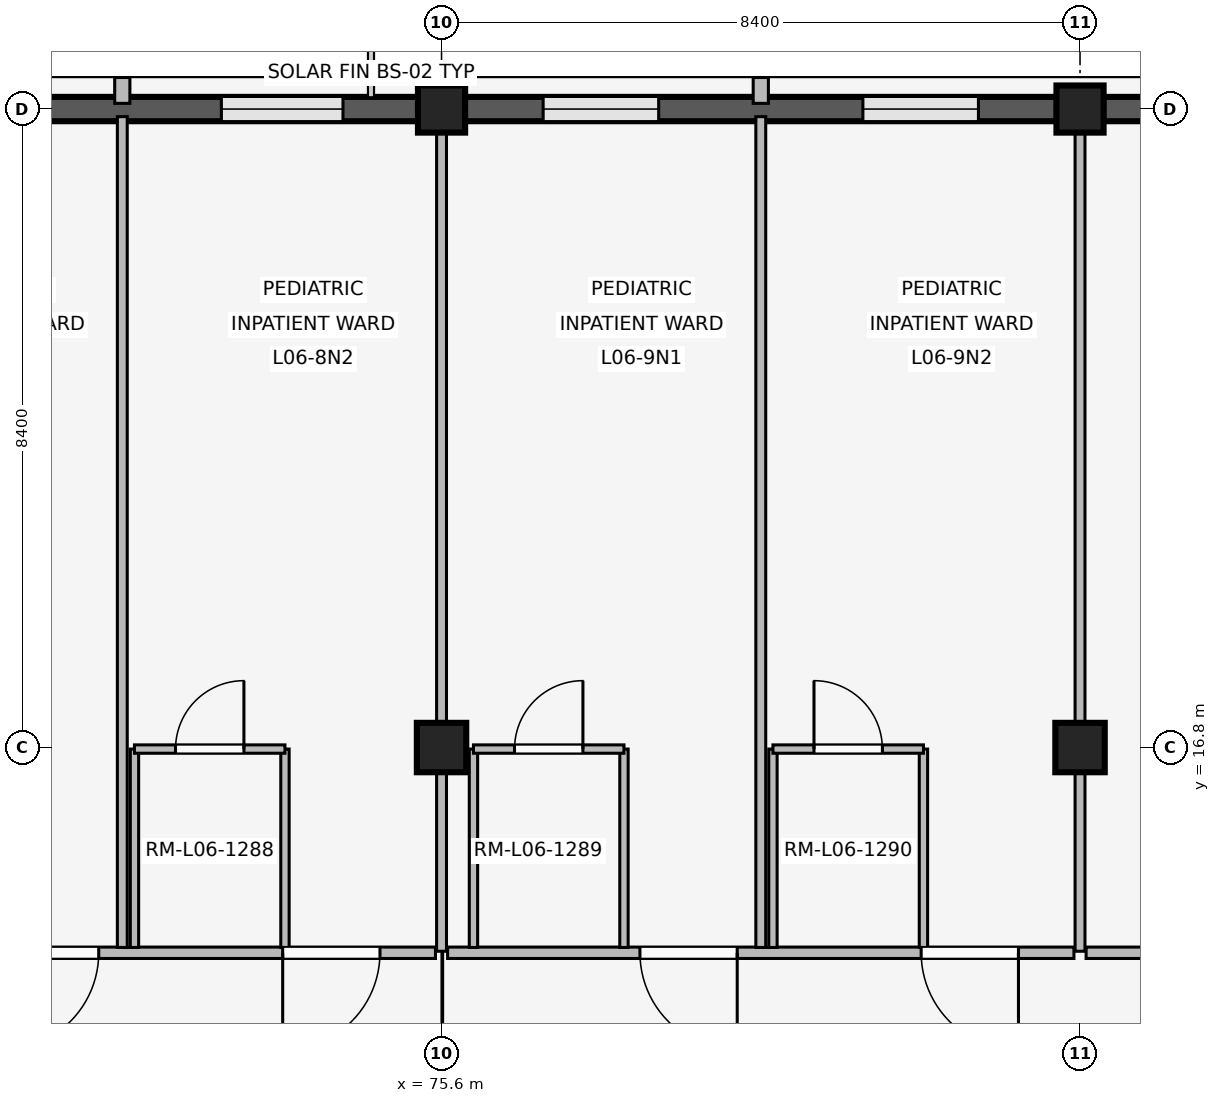
"""IFC4 building model, lengths in metres.
Left out: names, types, materials, properties, quantities, classifications, styles, units other than length and angle.
Written with IfcOpenShell. Run it as: python <this file> out.ifc"""

import sys

from ifc_helpers import new_model, si_unit, direction, frame, frame_2d, origin, origin_2d, place, context, subcontext, project, spatial, rectangle, extrude, element, fill, save


model = new_model("IFC4")
c1 = context("Model", 3, precision=1e-05, world=origin(), true_north=direction((0.0, 1.0)))
c2 = subcontext(c1, "Body", "Model", "MODEL_VIEW")
j1 = project(units=[si_unit("LENGTHUNIT", "METRE"), si_unit("PLANEANGLEUNIT", "RADIAN")], contexts=[c1])
p1 = place(None, origin())
s1 = spatial("IfcSite", under=j1, at=p1, CompositionType="ELEMENT")
p2 = place(p1, origin())
s2 = spatial("IfcBuilding", under=s1, at=p2, CompositionType="ELEMENT")
p3 = place(p2, frame((0.0, 0.0, 24.6)))
s3 = spatial("IfcBuildingStorey", under=s2, at=p3, CompositionType="ELEMENT", Elevation=24.6)
p4 = place(p3, frame((75.6, 16.8, 0.0), z_axis=(0.0, 0.0, 1.0), x_axis=(1.0, 0.0, 0.0)))
e1 = element("IfcColumn", 1, at=p4, inside=s3, PredefinedType="COLUMN", context=c2, shape_type="SweptSolid", body=[
    extrude(rectangle(XDim=0.65, YDim=0.65, at=origin_2d()), origin(), (0.0, 0.0, 1.0), 4.2),
])
p5 = place(p3, frame((75.6, 25.2, 0.0), z_axis=(0.0, 0.0, 1.0), x_axis=(1.0, 0.0, 0.0)))
e2 = element("IfcColumn", 2, at=p5, inside=s3, PredefinedType="COLUMN", context=c2, shape_type="SweptSolid", body=[
    extrude(rectangle(XDim=0.62, YDim=0.62, at=origin_2d()), origin(), (0.0, 0.0, 1.0), 4.2),
])
p6 = place(p3, frame((84.0, 16.8, 0.0), z_axis=(0.0, 0.0, 1.0), x_axis=(1.0, 0.0, 0.0)))
e3 = element("IfcColumn", 3, at=p6, inside=s3, PredefinedType="COLUMN", context=c2, shape_type="SweptSolid", body=[
    extrude(rectangle(XDim=0.65, YDim=0.65, at=origin_2d()), origin(), (0.0, 0.0, 1.0), 4.2),
])
p7 = place(p3, frame((84.0, 25.2, 0.0), z_axis=(0.0, 0.0, 1.0), x_axis=(1.0, 0.0, 0.0)))
e4 = element("IfcColumn", 4, at=p7, inside=s3, PredefinedType="COLUMN", context=c2, shape_type="SweptSolid", body=[
    extrude(rectangle(XDim=0.62, YDim=0.62, at=origin_2d()), origin(), (0.0, 0.0, 1.0), 4.2),
])
p8 = place(p3, frame((67.505, 25.2, 0.0), z_axis=(0.0, 0.0, 1.0), x_axis=(1.0, 0.0, 0.0)))
e5 = element("IfcWall", 5, at=p8, inside=s3, PredefinedType="SOLIDWALL", context=c2, shape_type="SweptSolid", body=[
    extrude(rectangle(XDim=7.79, YDim=0.32, at=frame_2d((3.895, 0.0))), origin(), (0.0, 0.0, 1.0), 3.34),
])
p9 = place(p8, frame((0.992, 0.0, 0.85)))
e6 = element("IfcOpeningElement", 6, at=p9, cuts=e5, PredefinedType="OPENING", context=c2, shape_type="SweptSolid", body=[
    extrude(rectangle(XDim=1.6, YDim=1.65, at=frame_2d((0.8, 0.825))), frame((0.0, 0.17, 0.0), z_axis=(0.0, -1.0, 0.0), x_axis=(1.0, 0.0, 0.0)), (0.0, 0.0, 1.0), 0.34),
])
p10 = place(p8, frame((5.198, 0.0, 0.85)))
e7 = element("IfcOpeningElement", 7, at=p10, cuts=e5, PredefinedType="OPENING", context=c2, shape_type="SweptSolid", body=[
    extrude(rectangle(XDim=1.6, YDim=1.65, at=frame_2d((0.8, 0.825))), frame((0.0, 0.17, 0.0), z_axis=(0.0, -1.0, 0.0), x_axis=(1.0, 0.0, 0.0)), (0.0, 0.0, 1.0), 0.34),
])
p11 = place(p3, frame((71.4, 25.275, 0.0), z_axis=(0.0, 0.0, 1.0), x_axis=(0.0, 1.0, 0.0)))
e8 = element("IfcWall", 8, at=p11, inside=s3, PredefinedType="ELEMENTEDWALL", context=c2, shape_type="SweptSolid", body=[
    extrude(rectangle(XDim=0.34, YDim=0.2, at=frame_2d((0.17, 0.0))), origin(), (0.0, 0.0, 1.0), 3.32),
])
p12 = place(p3, frame((75.905, 25.2, 0.0), z_axis=(0.0, 0.0, 1.0), x_axis=(1.0, 0.0, 0.0)))
e9 = element("IfcWall", 9, at=p12, inside=s3, PredefinedType="SOLIDWALL", context=c2, shape_type="SweptSolid", body=[
    extrude(rectangle(XDim=7.79, YDim=0.32, at=frame_2d((3.895, 0.0))), origin(), (0.0, 0.0, 1.0), 3.34),
])
p13 = place(p12, frame((1.032, 0.0, 0.85)))
e10 = element("IfcOpeningElement", 10, at=p13, cuts=e9, PredefinedType="OPENING", context=c2, shape_type="SweptSolid", body=[
    extrude(rectangle(XDim=1.52, YDim=1.65, at=frame_2d((0.76, 0.825))), frame((0.0, 0.17, 0.0), z_axis=(0.0, -1.0, 0.0), x_axis=(1.0, 0.0, 0.0)), (0.0, 0.0, 1.0), 0.34),
])
p14 = place(p12, frame((5.238, 0.0, 0.85)))
e11 = element("IfcOpeningElement", 11, at=p14, cuts=e9, PredefinedType="OPENING", context=c2, shape_type="SweptSolid", body=[
    extrude(rectangle(XDim=1.52, YDim=1.65, at=frame_2d((0.76, 0.825))), frame((0.0, 0.17, 0.0), z_axis=(0.0, -1.0, 0.0), x_axis=(1.0, 0.0, 0.0)), (0.0, 0.0, 1.0), 0.34),
])
p15 = place(p3, frame((79.8, 25.275, 0.0), z_axis=(0.0, 0.0, 1.0), x_axis=(0.0, 1.0, 0.0)))
e12 = element("IfcWall", 12, at=p15, inside=s3, PredefinedType="ELEMENTEDWALL", context=c2, shape_type="SweptSolid", body=[
    extrude(rectangle(XDim=0.34, YDim=0.2, at=frame_2d((0.17, 0.0))), origin(), (0.0, 0.0, 1.0), 3.32),
])
p16 = place(p3, frame((84.305, 25.2, 0.0), z_axis=(0.0, 0.0, 1.0), x_axis=(1.0, 0.0, 0.0)))
e13 = element("IfcWall", 13, at=p16, inside=s3, PredefinedType="SOLIDWALL", context=c2, shape_type="SweptSolid", body=[
    extrude(rectangle(XDim=7.79, YDim=0.32, at=frame_2d((3.895, 0.0))), origin(), (0.0, 0.0, 1.0), 3.34),
])
p17 = place(p16, frame((1.117, 0.0, 0.85)))
e14 = element("IfcOpeningElement", 14, at=p17, cuts=e13, PredefinedType="OPENING", context=c2, shape_type="SweptSolid", body=[
    extrude(rectangle(XDim=1.35, YDim=1.55, at=frame_2d((0.675, 0.775))), frame((0.0, 0.17, 0.0), z_axis=(0.0, -1.0, 0.0), x_axis=(1.0, 0.0, 0.0)), (0.0, 0.0, 1.0), 0.34),
])
p18 = place(p16, frame((5.323, 0.0, 0.85)))
e15 = element("IfcOpeningElement", 15, at=p18, cuts=e13, PredefinedType="OPENING", context=c2, shape_type="SweptSolid", body=[
    extrude(rectangle(XDim=1.35, YDim=1.55, at=frame_2d((0.675, 0.775))), frame((0.0, 0.17, 0.0), z_axis=(0.0, -1.0, 0.0), x_axis=(1.0, 0.0, 0.0)), (0.0, 0.0, 1.0), 0.34),
])
p19 = place(p3, frame((75.52, 14.1, 0.0), z_axis=(0.0, 0.0, 1.0), x_axis=(-1.0, 0.0, 0.0)))
e16 = element("IfcWall", 16, at=p19, inside=s3, PredefinedType="PARTITIONING", context=c2, shape_type="SweptSolid", body=[
    extrude(rectangle(XDim=8.24, YDim=0.15, at=frame_2d((4.12, 0.0))), origin(), (0.0, 0.0, 1.0), 3.32),
])
p20 = place(p19, frame((0.73, 0.0, 0.0)))
e17 = element("IfcOpeningElement", 17, at=p20, cuts=e16, PredefinedType="OPENING", context=c2, shape_type="SweptSolid", body=[
    extrude(rectangle(XDim=1.28, YDim=2.2, at=frame_2d((0.64, 1.1))), frame((0.0, 0.085, 0.0), z_axis=(0.0, -1.0, 0.0), x_axis=(1.0, 0.0, 0.0)), (0.0, 0.0, 1.0), 0.17),
])
p21 = place(p19, frame((4.43, 0.0, 0.0)))
e18 = element("IfcOpeningElement", 18, at=p21, cuts=e16, PredefinedType="OPENING", context=c2, shape_type="SweptSolid", body=[
    extrude(rectangle(XDim=1.28, YDim=2.2, at=frame_2d((0.64, 1.1))), frame((0.0, 0.085, 0.0), z_axis=(0.0, -1.0, 0.0), x_axis=(1.0, 0.0, 0.0)), (0.0, 0.0, 1.0), 0.17),
])
p22 = place(p3, frame((71.4, 14.17, 0.0), z_axis=(0.0, 0.0, 1.0), x_axis=(0.0, 1.0, 0.0)))
e19 = element("IfcWall", 19, at=p22, inside=s3, PredefinedType="PARTITIONING", context=c2, shape_type="SweptSolid", body=[
    extrude(rectangle(XDim=10.93, YDim=0.13, at=frame_2d((5.465, 0.0))), origin(), (0.0, 0.0, 1.0), 3.32),
])
for number, where, z_axis, x_axis in (
    (20, (71.56, 14.17, 0.0), (0.0, 0.0, 1.0), (0.0, 1.0, 0.0)),
    (21, (73.54, 14.17, 0.0), (0.0, 0.0, 1.0), (0.0, 1.0, 0.0)),
):
    element("IfcWall", number, at=place(p3, frame(where, z_axis=z_axis, x_axis=x_axis)), inside=s3, PredefinedType="PARTITIONING", context=c2, shape_type="SweptSolid", body=[
        extrude(rectangle(XDim=2.61, YDim=0.11, at=frame_2d((1.305, 0.0))), origin(), (0.0, 0.0, 1.0), 3.32),
    ])
p23 = place(p3, frame((71.56, 16.78, 0.0), z_axis=(0.0, 0.0, 1.0), x_axis=(1.0, 0.0, 0.0)))
e22 = element("IfcWall", 22, at=p23, inside=s3, PredefinedType="PARTITIONING", context=c2, shape_type="SweptSolid", body=[
    extrude(rectangle(XDim=1.98, YDim=0.11, at=frame_2d((0.99, 0.0))), origin(), (0.0, 0.0, 1.0), 3.32),
])
p24 = place(p23, frame((0.54, 0.0, 0.0)))
e23 = element("IfcOpeningElement", 23, at=p24, cuts=e22, PredefinedType="OPENING", context=c2, shape_type="SweptSolid", body=[
    extrude(rectangle(XDim=0.9, YDim=2.1, at=frame_2d((0.45, 1.05))), frame((0.0, 0.065, 0.0), z_axis=(0.0, -1.0, 0.0), x_axis=(1.0, 0.0, 0.0)), (0.0, 0.0, 1.0), 0.13),
])
p25 = place(p3, frame((75.6, 14.12, 0.0), z_axis=(0.0, 0.0, 1.0), x_axis=(0.0, 1.0, 0.0)))
e24 = element("IfcWall", 24, at=p25, inside=s3, PredefinedType="PARTITIONING", context=c2, shape_type="SweptSolid", body=[
    extrude(rectangle(XDim=10.94, YDim=0.13, at=frame_2d((5.47, 0.0))), origin(), (0.0, 0.0, 1.0), 3.32),
])
p26 = place(p3, frame((83.92, 14.1, 0.0), z_axis=(0.0, 0.0, 1.0), x_axis=(-1.0, 0.0, 0.0)))
e25 = element("IfcWall", 25, at=p26, inside=s3, PredefinedType="PARTITIONING", context=c2, shape_type="SweptSolid", body=[
    extrude(rectangle(XDim=8.24, YDim=0.15, at=frame_2d((4.12, 0.0))), origin(), (0.0, 0.0, 1.0), 3.32),
])
p27 = place(p26, frame((0.73, 0.0, 0.0)))
e26 = element("IfcOpeningElement", 26, at=p27, cuts=e25, PredefinedType="OPENING", context=c2, shape_type="SweptSolid", body=[
    extrude(rectangle(XDim=1.28, YDim=2.2, at=frame_2d((0.64, 1.1))), frame((0.0, 0.085, 0.0), z_axis=(0.0, -1.0, 0.0), x_axis=(1.0, 0.0, 0.0)), (0.0, 0.0, 1.0), 0.17),
])
p28 = place(p26, frame((4.43, 0.0, 0.0)))
e27 = element("IfcOpeningElement", 27, at=p28, cuts=e25, PredefinedType="OPENING", context=c2, shape_type="SweptSolid", body=[
    extrude(rectangle(XDim=1.28, YDim=2.2, at=frame_2d((0.64, 1.1))), frame((0.0, 0.085, 0.0), z_axis=(0.0, -1.0, 0.0), x_axis=(1.0, 0.0, 0.0)), (0.0, 0.0, 1.0), 0.17),
])
p29 = place(p3, frame((79.8, 14.17, 0.0), z_axis=(0.0, 0.0, 1.0), x_axis=(0.0, 1.0, 0.0)))
e28 = element("IfcWall", 28, at=p29, inside=s3, PredefinedType="PARTITIONING", context=c2, shape_type="SweptSolid", body=[
    extrude(rectangle(XDim=10.93, YDim=0.13, at=frame_2d((5.465, 0.0))), origin(), (0.0, 0.0, 1.0), 3.32),
])
for number, where, z_axis, x_axis in (
    (29, (76.02, 14.17, 0.0), (0.0, 0.0, 1.0), (0.0, 1.0, 0.0)),
    (30, (78.0, 14.17, 0.0), (0.0, 0.0, 1.0), (0.0, 1.0, 0.0)),
):
    element("IfcWall", number, at=place(p3, frame(where, z_axis=z_axis, x_axis=x_axis)), inside=s3, PredefinedType="PARTITIONING", context=c2, shape_type="SweptSolid", body=[
        extrude(rectangle(XDim=2.61, YDim=0.11, at=frame_2d((1.305, 0.0))), origin(), (0.0, 0.0, 1.0), 3.32),
    ])
p30 = place(p3, frame((76.02, 16.78, 0.0), z_axis=(0.0, 0.0, 1.0), x_axis=(1.0, 0.0, 0.0)))
e31 = element("IfcWall", 31, at=p30, inside=s3, PredefinedType="PARTITIONING", context=c2, shape_type="SweptSolid", body=[
    extrude(rectangle(XDim=1.98, YDim=0.11, at=frame_2d((0.99, 0.0))), origin(), (0.0, 0.0, 1.0), 3.32),
])
p31 = place(p30, frame((0.54, 0.0, 0.0)))
e32 = element("IfcOpeningElement", 32, at=p31, cuts=e31, PredefinedType="OPENING", context=c2, shape_type="SweptSolid", body=[
    extrude(rectangle(XDim=0.9, YDim=2.1, at=frame_2d((0.45, 1.05))), frame((0.0, 0.065, 0.0), z_axis=(0.0, -1.0, 0.0), x_axis=(1.0, 0.0, 0.0)), (0.0, 0.0, 1.0), 0.13),
])
for number, where, z_axis, x_axis in (
    (33, (79.96, 14.17, 0.0), (0.0, 0.0, 1.0), (0.0, 1.0, 0.0)),
    (34, (81.94, 14.17, 0.0), (0.0, 0.0, 1.0), (0.0, 1.0, 0.0)),
):
    element("IfcWall", number, at=place(p3, frame(where, z_axis=z_axis, x_axis=x_axis)), inside=s3, PredefinedType="PARTITIONING", context=c2, shape_type="SweptSolid", body=[
        extrude(rectangle(XDim=2.61, YDim=0.11, at=frame_2d((1.305, 0.0))), origin(), (0.0, 0.0, 1.0), 3.32),
    ])
p32 = place(p3, frame((79.96, 16.78, 0.0), z_axis=(0.0, 0.0, 1.0), x_axis=(1.0, 0.0, 0.0)))
e35 = element("IfcWall", 35, at=p32, inside=s3, PredefinedType="PARTITIONING", context=c2, shape_type="SweptSolid", body=[
    extrude(rectangle(XDim=1.98, YDim=0.11, at=frame_2d((0.99, 0.0))), origin(), (0.0, 0.0, 1.0), 3.32),
])
p33 = place(p32, frame((0.54, 0.0, 0.0)))
e36 = element("IfcOpeningElement", 36, at=p33, cuts=e35, PredefinedType="OPENING", context=c2, shape_type="SweptSolid", body=[
    extrude(rectangle(XDim=0.9, YDim=2.1, at=frame_2d((0.45, 1.05))), frame((0.0, 0.065, 0.0), z_axis=(0.0, -1.0, 0.0), x_axis=(1.0, 0.0, 0.0)), (0.0, 0.0, 1.0), 0.13),
])
p34 = place(p3, frame((84.0, 14.12, 0.0), z_axis=(0.0, 0.0, 1.0), x_axis=(0.0, 1.0, 0.0)))
e37 = element("IfcWall", 37, at=p34, inside=s3, PredefinedType="PARTITIONING", context=c2, shape_type="SweptSolid", body=[
    extrude(rectangle(XDim=10.94, YDim=0.13, at=frame_2d((5.47, 0.0))), origin(), (0.0, 0.0, 1.0), 3.32),
])
p35 = place(p3, frame((92.04, 14.1, 0.0), z_axis=(0.0, 0.0, 1.0), x_axis=(-1.0, 0.0, 0.0)))
e38 = element("IfcWall", 38, at=p35, inside=s3, PredefinedType="PARTITIONING", context=c2, shape_type="SweptSolid", body=[
    extrude(rectangle(XDim=7.96, YDim=0.15, at=frame_2d((3.98, 0.0))), origin(), (0.0, 0.0, 1.0), 3.32),
])
p36 = place(p35, frame((3.355, 0.0, 0.0)))
e39 = element("IfcOpeningElement", 39, at=p36, cuts=e38, PredefinedType="OPENING", context=c2, shape_type="SweptSolid", body=[
    extrude(rectangle(XDim=1.25, YDim=2.2, at=frame_2d((0.625, 1.1))), frame((0.0, 0.085, 0.0), z_axis=(0.0, -1.0, 0.0), x_axis=(1.0, 0.0, 0.0)), (0.0, 0.0, 1.0), 0.17),
])
p37 = place(p10, origin())
e40 = element("IfcWindow", 40, at=p37, inside=s3, PartitioningType="SINGLE_PANEL", PredefinedType="WINDOW", context=c2, shape_type="SweptSolid", body=[
    extrude(rectangle(XDim=1.6, YDim=1.65, at=frame_2d((0.8, 0.825))), frame((0.0, 0.03, 0.0), z_axis=(0.0, -1.0, 0.0), x_axis=(1.0, 0.0, 0.0)), (0.0, 0.0, 1.0), 0.06),
])
fill(e7, e40)
p38 = place(p13, origin())
e41 = element("IfcWindow", 41, at=p38, inside=s3, PartitioningType="SINGLE_PANEL", PredefinedType="WINDOW", context=c2, shape_type="SweptSolid", body=[
    extrude(rectangle(XDim=1.52, YDim=1.65, at=frame_2d((0.76, 0.825))), frame((0.0, 0.03, 0.0), z_axis=(0.0, -1.0, 0.0), x_axis=(1.0, 0.0, 0.0)), (0.0, 0.0, 1.0), 0.06),
])
fill(e10, e41)
p39 = place(p14, origin())
e42 = element("IfcWindow", 42, at=p39, inside=s3, PartitioningType="SINGLE_PANEL", PredefinedType="WINDOW", context=c2, shape_type="SweptSolid", body=[
    extrude(rectangle(XDim=1.52, YDim=1.65, at=frame_2d((0.76, 0.825))), frame((0.0, 0.03, 0.0), z_axis=(0.0, -1.0, 0.0), x_axis=(1.0, 0.0, 0.0)), (0.0, 0.0, 1.0), 0.06),
])
fill(e11, e42)
p40 = place(p20, origin())
e43 = element("IfcDoor", 43, at=p40, inside=s3, OperationType="SINGLE_SWING_RIGHT", PredefinedType="DOOR", context=c2, shape_type="SweptSolid", body=[
    extrude(rectangle(XDim=1.28, YDim=2.2, at=frame_2d((0.64, 1.1))), frame((0.0, 0.025, 0.0), z_axis=(0.0, -1.0, 0.0), x_axis=(1.0, 0.0, 0.0)), (0.0, 0.0, 1.0), 0.05),
])
fill(e17, e43)
p41 = place(p21, origin())
e44 = element("IfcDoor", 44, at=p41, inside=s3, OperationType="SINGLE_SWING_RIGHT", PredefinedType="DOOR", context=c2, shape_type="SweptSolid", body=[
    extrude(rectangle(XDim=1.28, YDim=2.2, at=frame_2d((0.64, 1.1))), frame((0.0, 0.025, 0.0), z_axis=(0.0, -1.0, 0.0), x_axis=(1.0, 0.0, 0.0)), (0.0, 0.0, 1.0), 0.05),
])
fill(e18, e44)
p42 = place(p24, origin())
e45 = element("IfcDoor", 45, at=p42, inside=s3, OperationType="SINGLE_SWING_RIGHT", PredefinedType="DOOR", context=c2, shape_type="SweptSolid", body=[
    extrude(rectangle(XDim=0.9, YDim=2.1, at=frame_2d((0.45, 1.05))), frame((0.0, 0.025, 0.0), z_axis=(0.0, -1.0, 0.0), x_axis=(1.0, 0.0, 0.0)), (0.0, 0.0, 1.0), 0.05),
])
fill(e23, e45)
p43 = place(p27, origin())
e46 = element("IfcDoor", 46, at=p43, inside=s3, OperationType="SINGLE_SWING_LEFT", PredefinedType="DOOR", context=c2, shape_type="SweptSolid", body=[
    extrude(rectangle(XDim=1.28, YDim=2.2, at=frame_2d((0.64, 1.1))), frame((0.0, 0.025, 0.0), z_axis=(0.0, -1.0, 0.0), x_axis=(1.0, 0.0, 0.0)), (0.0, 0.0, 1.0), 0.05),
])
fill(e26, e46)
p44 = place(p28, origin())
e47 = element("IfcDoor", 47, at=p44, inside=s3, OperationType="SINGLE_SWING_LEFT", PredefinedType="DOOR", context=c2, shape_type="SweptSolid", body=[
    extrude(rectangle(XDim=1.28, YDim=2.2, at=frame_2d((0.64, 1.1))), frame((0.0, 0.025, 0.0), z_axis=(0.0, -1.0, 0.0), x_axis=(1.0, 0.0, 0.0)), (0.0, 0.0, 1.0), 0.05),
])
fill(e27, e47)
p45 = place(p31, origin())
e48 = element("IfcDoor", 48, at=p45, inside=s3, OperationType="SINGLE_SWING_RIGHT", PredefinedType="DOOR", context=c2, shape_type="SweptSolid", body=[
    extrude(rectangle(XDim=0.9, YDim=2.1, at=frame_2d((0.45, 1.05))), frame((0.0, 0.025, 0.0), z_axis=(0.0, -1.0, 0.0), x_axis=(1.0, 0.0, 0.0)), (0.0, 0.0, 1.0), 0.05),
])
fill(e32, e48)
p46 = place(p33, origin())
e49 = element("IfcDoor", 49, at=p46, inside=s3, OperationType="SINGLE_SWING_LEFT", PredefinedType="DOOR", context=c2, shape_type="SweptSolid", body=[
    extrude(rectangle(XDim=0.9, YDim=2.1, at=frame_2d((0.45, 1.05))), frame((0.0, 0.025, 0.0), z_axis=(0.0, -1.0, 0.0), x_axis=(1.0, 0.0, 0.0)), (0.0, 0.0, 1.0), 0.05),
])
fill(e36, e49)
save(model, sys.argv[1])
